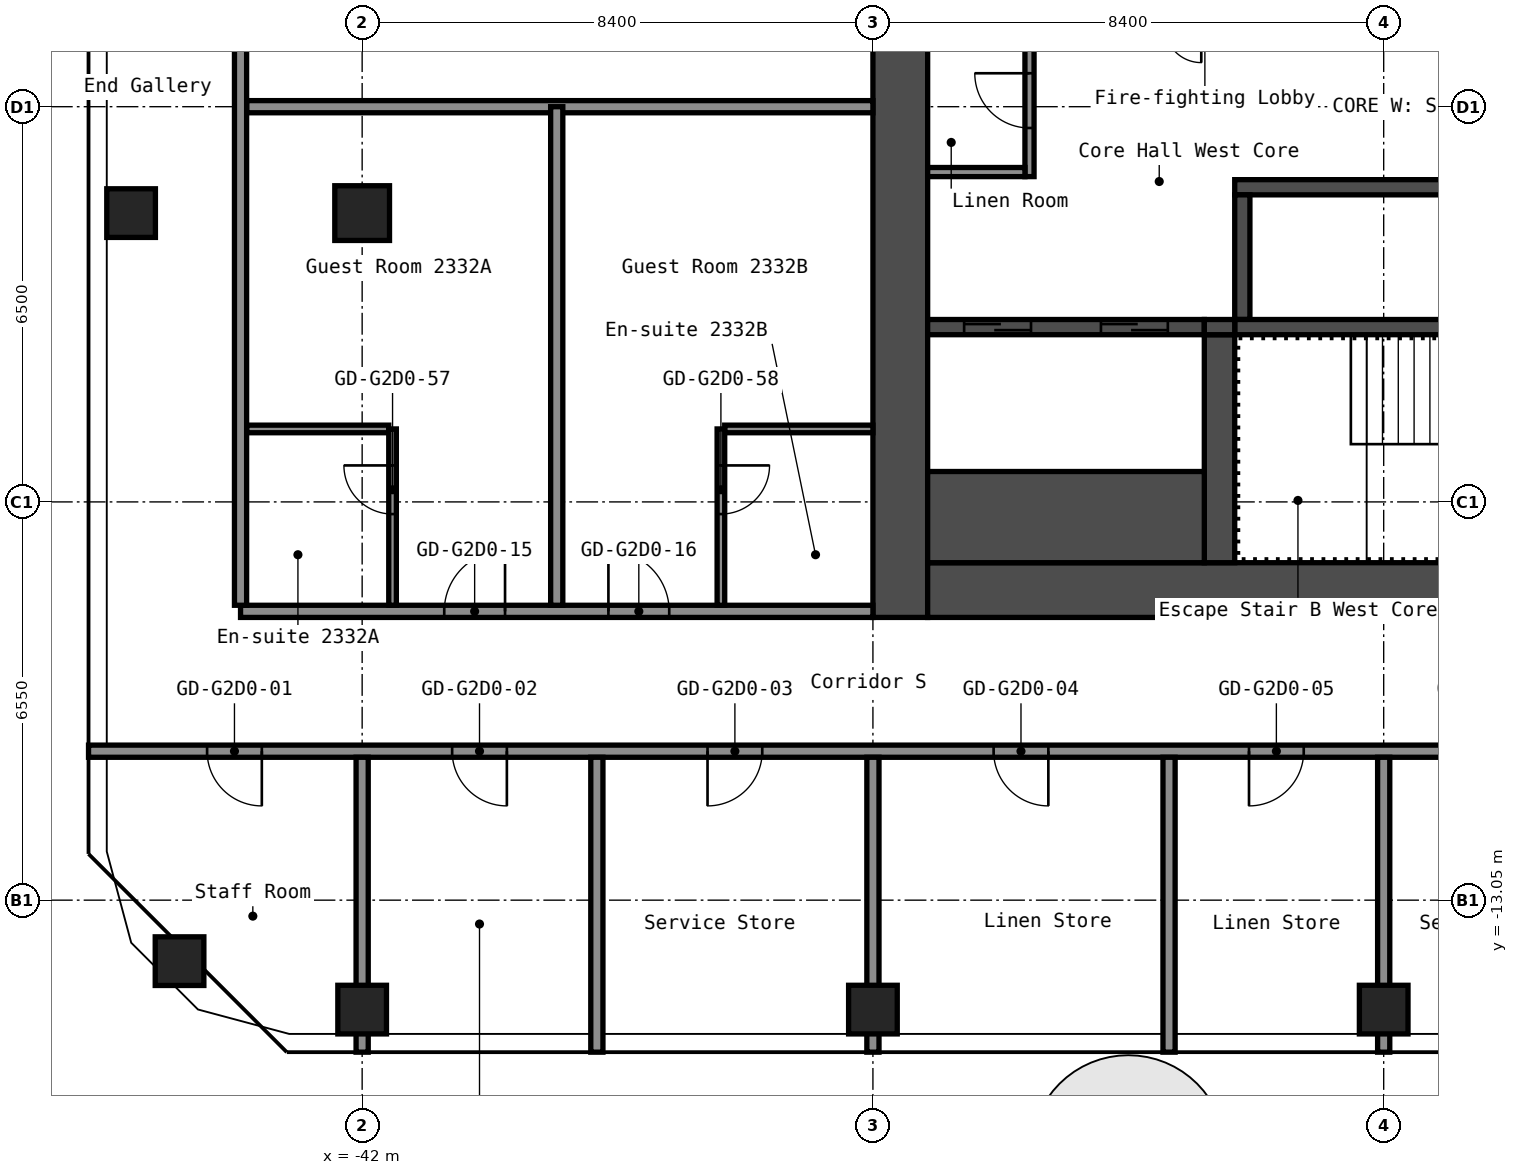
"""IFC4 building model, lengths in metres.
Left out: names, types, materials, properties, quantities, classifications, styles, units other than length and angle.
Written with IfcOpenShell. Run it as: python <this file> out.ifc"""

import sys

from ifc_helpers import new_model, si_unit, direction, frame, frame_2d, origin, origin_2d, place, context, subcontext, project, spatial, rectangle, hollow_rectangle, extrude, element, fill, save


model = new_model("IFC4")
c1 = context("Model", 3, precision=1e-05, world=origin(), true_north=direction((0.0, 1.0)))
c2 = subcontext(c1, "Body", "Model", "MODEL_VIEW")
j1 = project(units=[si_unit("LENGTHUNIT", "METRE"), si_unit("PLANEANGLEUNIT", "RADIAN")], contexts=[c1])
p1 = place(None, origin())
s1 = spatial("IfcSite", under=j1, at=p1, CompositionType="ELEMENT")
p2 = place(p1, origin())
s2 = spatial("IfcBuilding", under=s1, at=p2, CompositionType="ELEMENT")
p3 = place(p2, frame((0.0, 0.0, 85.0)))
s3 = spatial("IfcBuildingStorey", under=s2, at=p3, CompositionType="ELEMENT", Elevation=85.0)
for number, where, z_axis, x_axis in (
    (1, (-45.003, -14.053, 0.0), (0.0, 0.0, 1.0), (1.0, 0.0, 0.0)),
    (2, (-45.8, -1.75, 0.0), (0.0, 0.0, 1.0), (1.0, 0.0, 0.0)),
    (3, (-42.0, -14.85, 0.0), (0.0, 0.0, 1.0), (1.0, 0.0, 0.0)),
):
    element("IfcColumn", number, at=place(p3, frame(where, z_axis=z_axis, x_axis=x_axis)), inside=s3, PredefinedType="COLUMN", context=c2, shape_type="SweptSolid", body=[
        extrude(hollow_rectangle(XDim=0.8, YDim=0.8, WallThickness=0.032, at=origin_2d()), origin(), (0.0, 0.0, 1.0), 2.8),
    ])
p4 = place(p3, frame((-42.0, -1.75, 0.0), z_axis=(0.0, 0.0, 1.0), x_axis=(1.0, 0.0, 0.0)))
e4 = element("IfcColumn", 4, at=p4, inside=s3, PredefinedType="COLUMN", context=c2, shape_type="SweptSolid", body=[
    extrude(hollow_rectangle(XDim=0.9, YDim=0.9, WallThickness=0.036, at=origin_2d()), origin(), (0.0, 0.0, 1.0), 2.8),
])
for number, where, z_axis, x_axis in (
    (5, (-33.6, -14.85, 0.0), (0.0, 0.0, 1.0), (1.0, 0.0, 0.0)),
    (6, (-25.2, -14.85, 0.0), (0.0, 0.0, 1.0), (1.0, 0.0, 0.0)),
):
    element("IfcColumn", number, at=place(p3, frame(where, z_axis=z_axis, x_axis=x_axis)), inside=s3, PredefinedType="COLUMN", context=c2, shape_type="SweptSolid", body=[
        extrude(hollow_rectangle(XDim=0.8, YDim=0.8, WallThickness=0.032, at=origin_2d()), origin(), (0.0, 0.0, 1.0), 2.8),
    ])
p5 = place(p3, frame((-33.15, -8.4, 0.0), z_axis=(0.0, 0.0, 1.0), x_axis=(0.0, 1.0, 0.0)))
e7 = element("IfcWall", 7, at=p5, inside=s3, PredefinedType="SHEAR", context=c2, shape_type="SweptSolid", body=[
    extrude(rectangle(XDim=16.8, YDim=0.9, at=frame_2d((8.4, 0.0))), origin(), (0.0, 0.0, 1.0), 2.8),
])
p6 = place(p3, frame((-32.7, -7.95, 0.0), z_axis=(0.0, 0.0, 1.0), x_axis=(1.0, 0.0, 0.0)))
e8 = element("IfcWall", 8, at=p6, inside=s3, PredefinedType="SHEAR", context=c2, shape_type="SweptSolid", body=[
    extrude(rectangle(XDim=15.0, YDim=0.9, at=frame_2d((7.5, 0.0))), origin(), (0.0, 0.0, 1.0), 2.8),
])
p7 = place(p6, frame((11.45, 0.0, 0.0)))
e9 = element("IfcOpeningElement", 9, at=p7, cuts=e8, PredefinedType="OPENING", context=c2, shape_type="SweptSolid", body=[
    extrude(rectangle(XDim=1.0, YDim=2.1, at=frame_2d((0.5, 1.05))), frame((0.0, 0.46, 0.0), z_axis=(0.0, -1.0, 0.0), x_axis=(1.0, 0.0, 0.0)), (0.0, 0.0, 1.0), 0.92),
])
p8 = place(p3, frame((-27.65, -1.325, 0.0), z_axis=(0.0, 0.0, 1.0), x_axis=(1.0, 0.0, 0.0)))
e10 = element("IfcWall", 10, at=p8, inside=s3, PredefinedType="SHEAR", context=c2, shape_type="SweptSolid", body=[
    extrude(rectangle(XDim=7.5, YDim=0.25, at=frame_2d((3.75, 0.0))), origin(), (0.0, 0.0, 1.0), 2.8),
])
p9 = place(p3, frame((-27.525, -3.5, 0.0), z_axis=(0.0, 0.0, 1.0), x_axis=(0.0, 1.0, 0.0)))
e11 = element("IfcWall", 11, at=p9, inside=s3, PredefinedType="SHEAR", context=c2, shape_type="SweptSolid", body=[
    extrude(rectangle(XDim=2.05, YDim=0.25, at=frame_2d((1.025, 0.0))), origin(), (0.0, 0.0, 1.0), 2.8),
])
p10 = place(p3, frame((-27.65, -3.625, 0.0), z_axis=(0.0, 0.0, 1.0), x_axis=(1.0, 0.0, 0.0)))
e12 = element("IfcWall", 12, at=p10, inside=s3, PredefinedType="SHEAR", context=c2, shape_type="SweptSolid", body=[
    extrude(rectangle(XDim=7.5, YDim=0.25, at=frame_2d((3.75, 0.0))), origin(), (0.0, 0.0, 1.0), 2.8),
])
p11 = place(p3, frame((-27.9, -7.5, 0.0), z_axis=(0.0, 0.0, 1.0), x_axis=(0.0, 1.0, 0.0)))
e13 = element("IfcWall", 13, at=p11, inside=s3, PredefinedType="SHEAR", context=c2, shape_type="SweptSolid", body=[
    extrude(rectangle(XDim=3.75, YDim=0.5, at=frame_2d((1.875, 0.0))), origin(), (0.0, 0.0, 1.0), 2.8),
])
p12 = place(p3, frame((-32.7, -3.625, 0.0), z_axis=(0.0, 0.0, 1.0), x_axis=(1.0, 0.0, 0.0)))
e14 = element("IfcWall", 14, at=p12, inside=s3, PredefinedType="SHEAR", context=c2, shape_type="SweptSolid", body=[
    extrude(rectangle(XDim=4.55, YDim=0.25, at=frame_2d((2.275, 0.0))), origin(), (0.0, 0.0, 1.0), 2.8),
])
p13 = place(p12, frame((2.85, 0.0, 0.0)))
e15 = element("IfcOpeningElement", 15, at=p13, cuts=e14, PredefinedType="OPENING", context=c2, shape_type="SweptSolid", body=[
    extrude(rectangle(XDim=1.1, YDim=2.1, at=frame_2d((0.55, 1.05))), frame((0.0, 0.135, 0.0), z_axis=(0.0, -1.0, 0.0), x_axis=(1.0, 0.0, 0.0)), (0.0, 0.0, 1.0), 0.27),
])
p14 = place(p12, frame((0.6, 0.0, 0.0)))
e16 = element("IfcOpeningElement", 16, at=p14, cuts=e14, PredefinedType="OPENING", context=c2, shape_type="SweptSolid", body=[
    extrude(rectangle(XDim=1.1, YDim=2.1, at=frame_2d((0.55, 1.05))), frame((0.0, 0.135, 0.0), z_axis=(0.0, -1.0, 0.0), x_axis=(1.0, 0.0, 0.0)), (0.0, 0.0, 1.0), 0.27),
])
p15 = place(p3, frame((-32.7, -6.75, 0.0), z_axis=(0.0, 0.0, 1.0), x_axis=(1.0, 0.0, 0.0)))
e17 = element("IfcWall", 17, at=p15, inside=s3, PredefinedType="SHEAR", context=c2, shape_type="SweptSolid", body=[
    extrude(rectangle(XDim=4.55, YDim=1.5, at=frame_2d((2.275, 0.0))), origin(), (0.0, 0.0, 1.0), 2.8),
])
p16 = place(p3, frame((-28.15, -3.625, 0.0), z_axis=(0.0, 0.0, 1.0), x_axis=(1.0, 0.0, 0.0)))
e18 = element("IfcWall", 18, at=p16, inside=s3, PredefinedType="SHEAR", context=c2, shape_type="SweptSolid", body=[
    extrude(rectangle(XDim=0.5, YDim=0.25, at=frame_2d((0.25, 0.0))), origin(), (0.0, 0.0, 1.0), 2.8),
])
p17 = place(p3, frame((-31.025, -1.15, 0.0), z_axis=(0.0, 0.0, 1.0), x_axis=(0.0, 1.0, 0.0)))
e19 = element("IfcWall", 19, at=p17, inside=s3, PredefinedType="PARTITIONING", context=c2, shape_type="SweptSolid", body=[
    extrude(rectangle(XDim=2.35, YDim=0.15, at=frame_2d((1.175, 0.0))), origin(), (0.0, 0.0, 1.0), 2.8),
])
p18 = place(p17, frame((0.8, 0.0, 0.0)))
e20 = element("IfcOpeningElement", 20, at=p18, cuts=e19, PredefinedType="OPENING", context=c2, shape_type="SweptSolid", body=[
    extrude(rectangle(XDim=0.9, YDim=2.1, at=frame_2d((0.45, 1.05))), frame((0.0, 0.085, 0.0), z_axis=(0.0, -1.0, 0.0), x_axis=(1.0, 0.0, 0.0)), (0.0, 0.0, 1.0), 0.17),
])
p19 = place(p3, frame((-32.7, -1.075, 0.0), z_axis=(0.0, 0.0, 1.0), x_axis=(1.0, 0.0, 0.0)))
e21 = element("IfcWall", 21, at=p19, inside=s3, PredefinedType="PARTITIONING", context=c2, shape_type="SweptSolid", body=[
    extrude(rectangle(XDim=1.6, YDim=0.15, at=frame_2d((0.8, 0.0))), origin(), (0.0, 0.0, 1.0), 2.8),
])
p20 = place(p3, frame((-46.5, -10.6, 0.0), z_axis=(0.0, 0.0, 1.0), x_axis=(1.0, 0.0, 0.0)))
e22 = element("IfcWall", 22, at=p20, inside=s3, PredefinedType="PARTITIONING", context=c2, shape_type="SweptSolid", body=[
    extrude(rectangle(XDim=29.7, YDim=0.2, at=frame_2d((14.85, 0.0))), origin(), (0.0, 0.0, 1.0), 2.8),
])
p21 = place(p20, frame((1.95, 0.0, 0.0)))
e23 = element("IfcOpeningElement", 23, at=p21, cuts=e22, PredefinedType="OPENING", context=c2, shape_type="SweptSolid", body=[
    extrude(rectangle(XDim=0.9, YDim=2.1, at=frame_2d((0.45, 1.05))), frame((0.0, 0.11, 0.0), z_axis=(0.0, -1.0, 0.0), x_axis=(1.0, 0.0, 0.0)), (0.0, 0.0, 1.0), 0.22),
])
p22 = place(p20, frame((5.98, 0.0, 0.0)))
e24 = element("IfcOpeningElement", 24, at=p22, cuts=e22, PredefinedType="OPENING", context=c2, shape_type="SweptSolid", body=[
    extrude(rectangle(XDim=0.9, YDim=2.1, at=frame_2d((0.45, 1.05))), frame((0.0, 0.11, 0.0), z_axis=(0.0, -1.0, 0.0), x_axis=(1.0, 0.0, 0.0)), (0.0, 0.0, 1.0), 0.22),
])
p23 = place(p20, frame((10.18, 0.0, 0.0)))
e25 = element("IfcOpeningElement", 25, at=p23, cuts=e22, PredefinedType="OPENING", context=c2, shape_type="SweptSolid", body=[
    extrude(rectangle(XDim=0.9, YDim=2.1, at=frame_2d((0.45, 1.05))), frame((0.0, 0.11, 0.0), z_axis=(0.0, -1.0, 0.0), x_axis=(1.0, 0.0, 0.0)), (0.0, 0.0, 1.0), 0.22),
])
p24 = place(p20, frame((14.885, 0.0, 0.0)))
e26 = element("IfcOpeningElement", 26, at=p24, cuts=e22, PredefinedType="OPENING", context=c2, shape_type="SweptSolid", body=[
    extrude(rectangle(XDim=0.9, YDim=2.1, at=frame_2d((0.45, 1.05))), frame((0.0, 0.11, 0.0), z_axis=(0.0, -1.0, 0.0), x_axis=(1.0, 0.0, 0.0)), (0.0, 0.0, 1.0), 0.22),
])
p25 = place(p20, frame((19.085, 0.0, 0.0)))
e27 = element("IfcOpeningElement", 27, at=p25, cuts=e22, PredefinedType="OPENING", context=c2, shape_type="SweptSolid", body=[
    extrude(rectangle(XDim=0.9, YDim=2.1, at=frame_2d((0.45, 1.05))), frame((0.0, 0.11, 0.0), z_axis=(0.0, -1.0, 0.0), x_axis=(1.0, 0.0, 0.0)), (0.0, 0.0, 1.0), 0.22),
])
p26 = place(p20, frame((22.68, 0.0, 0.0)))
e28 = element("IfcOpeningElement", 28, at=p26, cuts=e22, PredefinedType="OPENING", context=c2, shape_type="SweptSolid", body=[
    extrude(rectangle(XDim=0.9, YDim=2.1, at=frame_2d((0.45, 1.05))), frame((0.0, 0.11, 0.0), z_axis=(0.0, -1.0, 0.0), x_axis=(1.0, 0.0, 0.0)), (0.0, 0.0, 1.0), 0.22),
])
p27 = place(p20, frame((26.88, 0.0, 0.0)))
e29 = element("IfcOpeningElement", 29, at=p27, cuts=e22, PredefinedType="OPENING", context=c2, shape_type="SweptSolid", body=[
    extrude(rectangle(XDim=0.9, YDim=2.1, at=frame_2d((0.45, 1.05))), frame((0.0, 0.11, 0.0), z_axis=(0.0, -1.0, 0.0), x_axis=(1.0, 0.0, 0.0)), (0.0, 0.0, 1.0), 0.22),
])
p28 = place(p3, frame((-44.0, -8.3, 0.0), z_axis=(0.0, 0.0, 1.0), x_axis=(1.0, 0.0, 0.0)))
e30 = element("IfcWall", 30, at=p28, inside=s3, PredefinedType="PARTITIONING", context=c2, shape_type="SweptSolid", body=[
    extrude(rectangle(XDim=10.4, YDim=0.2, at=frame_2d((5.2, 0.0))), origin(), (0.0, 0.0, 1.0), 2.8),
])
p29 = place(p28, frame((3.35, 0.0, 0.0)))
e31 = element("IfcOpeningElement", 31, at=p29, cuts=e30, PredefinedType="OPENING", context=c2, shape_type="SweptSolid", body=[
    extrude(rectangle(XDim=1.0, YDim=2.1, at=frame_2d((0.5, 1.05))), frame((0.0, 0.11, 0.0), z_axis=(0.0, -1.0, 0.0), x_axis=(1.0, 0.0, 0.0)), (0.0, 0.0, 1.0), 0.22),
])
p30 = place(p28, frame((6.05, 0.0, 0.0)))
e32 = element("IfcOpeningElement", 32, at=p30, cuts=e30, PredefinedType="OPENING", context=c2, shape_type="SweptSolid", body=[
    extrude(rectangle(XDim=1.0, YDim=2.1, at=frame_2d((0.5, 1.05))), frame((0.0, 0.11, 0.0), z_axis=(0.0, -1.0, 0.0), x_axis=(1.0, 0.0, 0.0)), (0.0, 0.0, 1.0), 0.22),
])
p31 = place(p3, frame((-43.9, -5.3, 0.0), z_axis=(0.0, 0.0, 1.0), x_axis=(1.0, 0.0, 0.0)))
e33 = element("IfcWall", 33, at=p31, inside=s3, PredefinedType="PARTITIONING", context=c2, shape_type="SweptSolid", body=[
    extrude(rectangle(XDim=2.337, YDim=0.125, at=frame_2d((1.169, 0.0))), origin(), (0.0, 0.0, 1.0), 2.8),
])
p32 = place(p3, frame((-36.038, -5.3, 0.0), z_axis=(0.0, 0.0, 1.0), x_axis=(1.0, 0.0, 0.0)))
e34 = element("IfcWall", 34, at=p32, inside=s3, PredefinedType="PARTITIONING", context=c2, shape_type="SweptSolid", body=[
    extrude(rectangle(XDim=2.438, YDim=0.125, at=frame_2d((1.219, 0.0))), origin(), (0.0, 0.0, 1.0), 2.8),
])
p33 = place(p3, frame((-43.9, 0.0, 0.0), z_axis=(0.0, 0.0, 1.0), x_axis=(1.0, 0.0, 0.0)))
e35 = element("IfcWall", 35, at=p33, inside=s3, PredefinedType="PARTITIONING", context=c2, shape_type="SweptSolid", body=[
    extrude(rectangle(XDim=10.3, YDim=0.2, at=frame_2d((5.15, 0.0))), origin(), (0.0, 0.0, 1.0), 2.8),
])
p34 = place(p3, frame((-44.0, -8.2, 0.0), z_axis=(0.0, 0.0, 1.0), x_axis=(0.0, 1.0, 0.0)))
e36 = element("IfcWall", 36, at=p34, inside=s3, PredefinedType="PARTITIONING", context=c2, shape_type="SweptSolid", body=[
    extrude(rectangle(XDim=16.4, YDim=0.2, at=frame_2d((8.2, 0.0))), origin(), (0.0, 0.0, 1.0), 2.8),
])
p35 = place(p3, frame((-42.0, -15.55, 0.0), z_axis=(0.0, 0.0, 1.0), x_axis=(0.0, 1.0, 0.0)))
e37 = element("IfcWall", 37, at=p35, inside=s3, PredefinedType="PARTITIONING", context=c2, shape_type="SweptSolid", body=[
    extrude(rectangle(XDim=4.85, YDim=0.2, at=frame_2d((2.425, 0.0))), origin(), (0.0, 0.0, 1.0), 2.8),
])
p36 = place(p3, frame((-41.5, -8.2, 0.0), z_axis=(0.0, 0.0, 1.0), x_axis=(0.0, 1.0, 0.0)))
e38 = element("IfcWall", 38, at=p36, inside=s3, PredefinedType="PARTITIONING", context=c2, shape_type="SweptSolid", body=[
    extrude(rectangle(XDim=2.9, YDim=0.125, at=frame_2d((1.45, 0.0))), origin(), (0.0, 0.0, 1.0), 2.8),
])
p37 = place(p36, frame((1.5, 0.0, 0.0)))
e39 = element("IfcOpeningElement", 39, at=p37, cuts=e38, PredefinedType="OPENING", context=c2, shape_type="SweptSolid", body=[
    extrude(rectangle(XDim=0.8, YDim=2.1, at=frame_2d((0.4, 1.05))), frame((0.0, 0.073, 0.0), z_axis=(0.0, -1.0, 0.0), x_axis=(1.0, 0.0, 0.0)), (0.0, 0.0, 1.0), 0.145),
])
p38 = place(p3, frame((-38.8, -8.2, 0.0), z_axis=(0.0, 0.0, 1.0), x_axis=(0.0, 1.0, 0.0)))
e40 = element("IfcWall", 40, at=p38, inside=s3, PredefinedType="PARTITIONING", context=c2, shape_type="SweptSolid", body=[
    extrude(rectangle(XDim=8.2, YDim=0.2, at=frame_2d((4.1, 0.0))), origin(), (0.0, 0.0, 1.0), 2.8),
])
p39 = place(p3, frame((-38.14, -15.55, 0.0), z_axis=(0.0, 0.0, 1.0), x_axis=(0.0, 1.0, 0.0)))
e41 = element("IfcWall", 41, at=p39, inside=s3, PredefinedType="PARTITIONING", context=c2, shape_type="SweptSolid", body=[
    extrude(rectangle(XDim=4.85, YDim=0.2, at=frame_2d((2.425, 0.0))), origin(), (0.0, 0.0, 1.0), 2.8),
])
p40 = place(p3, frame((-36.1, -8.2, 0.0), z_axis=(0.0, 0.0, 1.0), x_axis=(0.0, 1.0, 0.0)))
e42 = element("IfcWall", 42, at=p40, inside=s3, PredefinedType="PARTITIONING", context=c2, shape_type="SweptSolid", body=[
    extrude(rectangle(XDim=2.9, YDim=0.125, at=frame_2d((1.45, 0.0))), origin(), (0.0, 0.0, 1.0), 2.8),
])
p41 = place(p40, frame((1.5, 0.0, 0.0)))
e43 = element("IfcOpeningElement", 43, at=p41, cuts=e42, PredefinedType="OPENING", context=c2, shape_type="SweptSolid", body=[
    extrude(rectangle(XDim=0.8, YDim=2.1, at=frame_2d((0.4, 1.05))), frame((0.0, 0.073, 0.0), z_axis=(0.0, -1.0, 0.0), x_axis=(1.0, 0.0, 0.0)), (0.0, 0.0, 1.0), 0.145),
])
for number, where, z_axis, x_axis in (
    (44, (-33.6, -15.55, 0.0), (0.0, 0.0, 1.0), (0.0, 1.0, 0.0)),
    (45, (-28.73, -15.55, 0.0), (0.0, 0.0, 1.0), (0.0, 1.0, 0.0)),
    (46, (-25.2, -15.55, 0.0), (0.0, 0.0, 1.0), (0.0, 1.0, 0.0)),
):
    element("IfcWall", number, at=place(p3, frame(where, z_axis=z_axis, x_axis=x_axis)), inside=s3, PredefinedType="PARTITIONING", context=c2, shape_type="SweptSolid", body=[
        extrude(rectangle(XDim=4.85, YDim=0.2, at=frame_2d((2.425, 0.0))), origin(), (0.0, 0.0, 1.0), 2.8),
    ])
p42 = place(p18, origin())
e47 = element("IfcDoor", 47, at=p42, inside=s3, OperationType="SINGLE_SWING_LEFT", PredefinedType="DOOR", context=c2, shape_type="SweptSolid", body=[
    extrude(rectangle(XDim=0.9, YDim=2.1, at=frame_2d((0.45, 1.05))), frame((0.0, 0.025, 0.0), z_axis=(0.0, -1.0, 0.0), x_axis=(1.0, 0.0, 0.0)), (0.0, 0.0, 1.0), 0.05),
])
fill(e20, e47)
p43 = place(p13, origin())
e48 = element("IfcDoor", 48, at=p43, inside=s3, OperationType="DOUBLE_DOOR_SLIDING", PredefinedType="DOOR", context=c2, shape_type="SweptSolid", body=[
    extrude(rectangle(XDim=1.1, YDim=2.1, at=frame_2d((0.55, 1.05))), frame((0.0, 0.025, 0.0), z_axis=(0.0, -1.0, 0.0), x_axis=(1.0, 0.0, 0.0)), (0.0, 0.0, 1.0), 0.05),
])
fill(e15, e48)
p44 = place(p14, origin())
e49 = element("IfcDoor", 49, at=p44, inside=s3, OperationType="DOUBLE_DOOR_SLIDING", PredefinedType="DOOR", context=c2, shape_type="SweptSolid", body=[
    extrude(rectangle(XDim=1.1, YDim=2.1, at=frame_2d((0.55, 1.05))), frame((0.0, 0.025, 0.0), z_axis=(0.0, -1.0, 0.0), x_axis=(1.0, 0.0, 0.0)), (0.0, 0.0, 1.0), 0.05),
])
fill(e16, e49)
p45 = place(p21, origin())
e50 = element("IfcDoor", 50, at=p45, inside=s3, OperationType="SINGLE_SWING_RIGHT", PredefinedType="DOOR", context=c2, shape_type="SweptSolid", body=[
    extrude(rectangle(XDim=0.9, YDim=2.1, at=frame_2d((0.45, 1.05))), frame((0.0, 0.025, 0.0), z_axis=(0.0, -1.0, 0.0), x_axis=(1.0, 0.0, 0.0)), (0.0, 0.0, 1.0), 0.05),
])
fill(e23, e50)
p46 = place(p22, origin())
e51 = element("IfcDoor", 51, at=p46, inside=s3, OperationType="SINGLE_SWING_RIGHT", PredefinedType="DOOR", context=c2, shape_type="SweptSolid", body=[
    extrude(rectangle(XDim=0.9, YDim=2.1, at=frame_2d((0.45, 1.05))), frame((0.0, 0.025, 0.0), z_axis=(0.0, -1.0, 0.0), x_axis=(1.0, 0.0, 0.0)), (0.0, 0.0, 1.0), 0.05),
])
fill(e24, e51)
p47 = place(p23, origin())
e52 = element("IfcDoor", 52, at=p47, inside=s3, OperationType="SINGLE_SWING_LEFT", PredefinedType="DOOR", context=c2, shape_type="SweptSolid", body=[
    extrude(rectangle(XDim=0.9, YDim=2.1, at=frame_2d((0.45, 1.05))), frame((0.0, 0.025, 0.0), z_axis=(0.0, -1.0, 0.0), x_axis=(1.0, 0.0, 0.0)), (0.0, 0.0, 1.0), 0.05),
])
fill(e25, e52)
p48 = place(p24, origin())
e53 = element("IfcDoor", 53, at=p48, inside=s3, OperationType="SINGLE_SWING_RIGHT", PredefinedType="DOOR", context=c2, shape_type="SweptSolid", body=[
    extrude(rectangle(XDim=0.9, YDim=2.1, at=frame_2d((0.45, 1.05))), frame((0.0, 0.025, 0.0), z_axis=(0.0, -1.0, 0.0), x_axis=(1.0, 0.0, 0.0)), (0.0, 0.0, 1.0), 0.05),
])
fill(e26, e53)
p49 = place(p25, origin())
e54 = element("IfcDoor", 54, at=p49, inside=s3, OperationType="SINGLE_SWING_LEFT", PredefinedType="DOOR", context=c2, shape_type="SweptSolid", body=[
    extrude(rectangle(XDim=0.9, YDim=2.1, at=frame_2d((0.45, 1.05))), frame((0.0, 0.025, 0.0), z_axis=(0.0, -1.0, 0.0), x_axis=(1.0, 0.0, 0.0)), (0.0, 0.0, 1.0), 0.05),
])
fill(e27, e54)
p50 = place(p29, origin())
e55 = element("IfcDoor", 55, at=p50, inside=s3, OperationType="SINGLE_SWING_LEFT", PredefinedType="DOOR", context=c2, shape_type="SweptSolid", body=[
    extrude(rectangle(XDim=1.0, YDim=2.1, at=frame_2d((0.5, 1.05))), frame((0.0, 0.025, 0.0), z_axis=(0.0, -1.0, 0.0), x_axis=(1.0, 0.0, 0.0)), (0.0, 0.0, 1.0), 0.05),
])
fill(e31, e55)
p51 = place(p30, origin())
e56 = element("IfcDoor", 56, at=p51, inside=s3, OperationType="SINGLE_SWING_RIGHT", PredefinedType="DOOR", context=c2, shape_type="SweptSolid", body=[
    extrude(rectangle(XDim=1.0, YDim=2.1, at=frame_2d((0.5, 1.05))), frame((0.0, 0.025, 0.0), z_axis=(0.0, -1.0, 0.0), x_axis=(1.0, 0.0, 0.0)), (0.0, 0.0, 1.0), 0.05),
])
fill(e32, e56)
p52 = place(p37, origin())
e57 = element("IfcDoor", 57, at=p52, inside=s3, OperationType="SINGLE_SWING_LEFT", PredefinedType="DOOR", context=c2, shape_type="SweptSolid", body=[
    extrude(rectangle(XDim=0.8, YDim=2.1, at=frame_2d((0.4, 1.05))), frame((0.0, 0.025, 0.0), z_axis=(0.0, -1.0, 0.0), x_axis=(1.0, 0.0, 0.0)), (0.0, 0.0, 1.0), 0.05),
])
fill(e39, e57)
p53 = place(p41, origin())
e58 = element("IfcDoor", 58, at=p53, inside=s3, OperationType="SINGLE_SWING_RIGHT", PredefinedType="DOOR", context=c2, shape_type="SweptSolid", body=[
    extrude(rectangle(XDim=0.8, YDim=2.1, at=frame_2d((0.4, 1.05))), frame((0.0, 0.025, 0.0), z_axis=(0.0, -1.0, 0.0), x_axis=(1.0, 0.0, 0.0)), (0.0, 0.0, 1.0), 0.05),
])
fill(e43, e58)
save(model, sys.argv[1])
